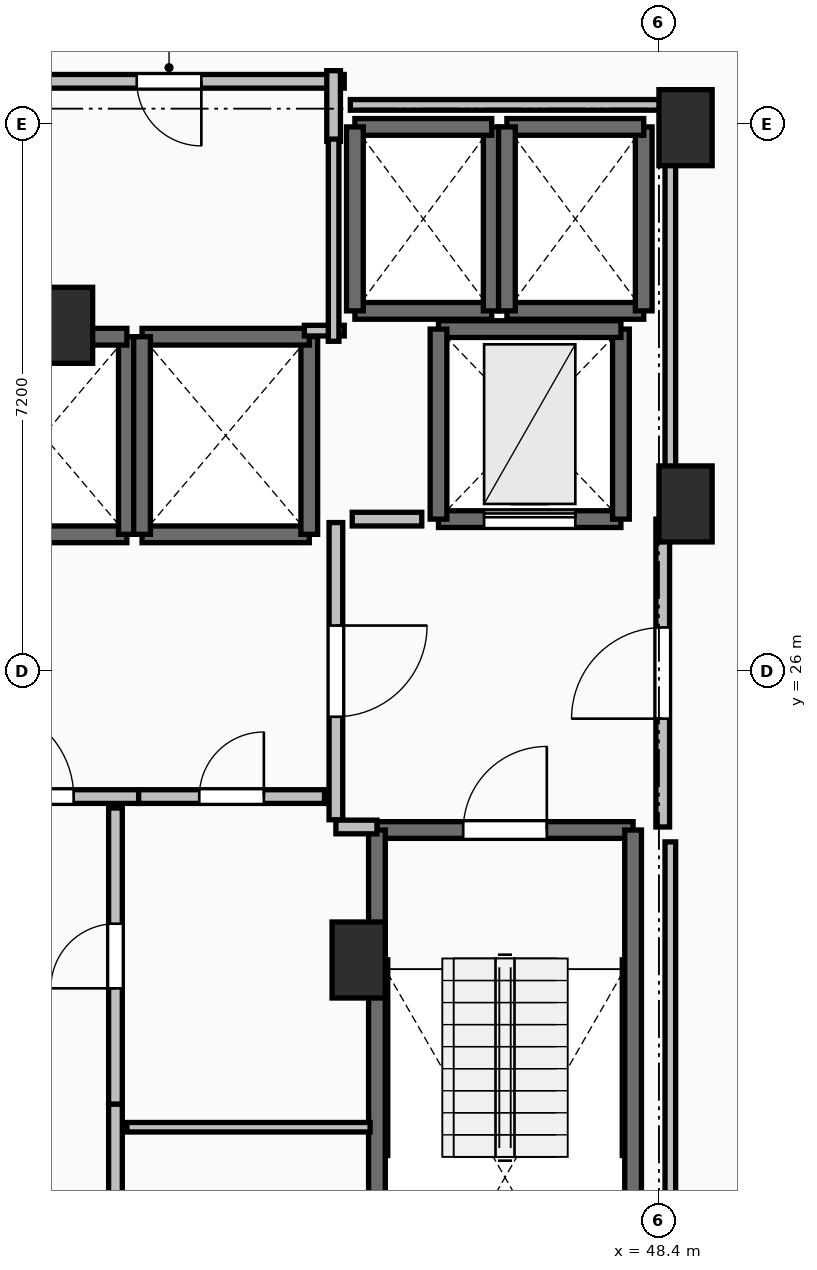
"""IFC4 building model, lengths in metres.
Left out: names, types, materials, properties, quantities, classifications, styles, units other than length and angle.
Written with IfcOpenShell. Run it as: python <this file> out.ifc"""

import sys

from ifc_helpers import new_model, si_unit, direction, frame, frame_2d, origin, origin_2d, place, context, subcontext, project, spatial, rectangle, extrude, element, fill, save


model = new_model("IFC4")
c1 = context("Model", 3, precision=1e-05, world=origin(), true_north=direction((0.0, 1.0)))
c2 = subcontext(c1, "Body", "Model", "MODEL_VIEW")
j1 = project(units=[si_unit("LENGTHUNIT", "METRE"), si_unit("PLANEANGLEUNIT", "RADIAN")], contexts=[c1])
p1 = place(None, origin())
s1 = spatial("IfcSite", under=j1, at=p1, CompositionType="ELEMENT")
p2 = place(p1, origin())
s2 = spatial("IfcBuilding", under=s1, at=p2, CompositionType="ELEMENT")
p3 = place(p2, frame((0.0, 0.0, 196.6)))
s3 = spatial("IfcBuildingStorey", under=s2, at=p3, CompositionType="ELEMENT", Elevation=196.6)
for number, where, z_axis, x_axis in (
    (1, (48.75, 33.15, 0.0), (0.0, 0.0, 1.0), (1.0, 0.0, 0.0)),
    (2, (48.75, 28.2, 0.0), (0.0, 0.0, 1.0), (1.0, 0.0, 0.0)),
    (3, (44.45, 22.2, 0.0), (0.0, 0.0, 1.0), (1.0, 0.0, 0.0)),
    (4, (40.6, 30.55, 0.0), (0.0, 0.0, 1.0), (1.0, 0.0, 0.0)),
):
    element("IfcColumn", number, at=place(p3, frame(where, z_axis=z_axis, x_axis=x_axis)), inside=s3, PredefinedType="PILASTER", context=c2, shape_type="SweptSolid", body=[
        extrude(rectangle(XDim=0.7, YDim=1.0, at=origin_2d()), origin(), (0.0, 0.0, 1.0), 3.5),
    ])
p4 = place(p3, frame((44.69, 23.91, 0.0), z_axis=(0.0, 0.0, 1.0), x_axis=(1.0, 0.0, 0.0)))
e5 = element("IfcWall", 5, at=p4, inside=s3, PredefinedType="SOLIDWALL", context=c2, shape_type="SweptSolid", body=[
    extrude(rectangle(XDim=3.37, YDim=0.22, at=frame_2d((1.685, 0.0))), origin(), (0.0, 0.0, 1.0), 3.24),
])
p5 = place(p4, frame((1.135, 0.0, 0.0)))
e6 = element("IfcOpeningElement", 6, at=p5, cuts=e5, PredefinedType="OPENING", context=c2, shape_type="SweptSolid", body=[
    extrude(rectangle(XDim=1.1, YDim=2.15, at=frame_2d((0.55, 1.075))), frame((0.0, 0.125, 0.0), z_axis=(0.0, -1.0, 0.0), x_axis=(1.0, 0.0, 0.0)), (0.0, 0.0, 1.0), 0.25),
])
for number, where, z_axis, x_axis in (
    (7, (48.06, 23.91, 0.0), (0.0, 0.0, 1.0), (0.0, -1.0, 0.0)),
    (8, (44.69, 16.49, 0.0), (0.0, 0.0, 1.0), (0.0, 1.0, 0.0)),
):
    element("IfcWall", number, at=place(p3, frame(where, z_axis=z_axis, x_axis=x_axis)), inside=s3, PredefinedType="SOLIDWALL", context=c2, shape_type="SweptSolid", body=[
        extrude(rectangle(XDim=7.42, YDim=0.22, at=frame_2d((3.71, 0.0))), origin(), (0.0, 0.0, 1.0), 3.24),
    ])
p6 = place(p3, frame((39.2, 27.8, 0.0), z_axis=(0.0, 0.0, 1.0), x_axis=(1.0, 0.0, 0.0)))
e9 = element("IfcWall", 9, at=p6, inside=s3, PredefinedType="SOLIDWALL", context=c2, shape_type="SweptSolid", body=[
    extrude(rectangle(XDim=2.2, YDim=0.22, at=frame_2d((1.1, 0.0))), origin(), (0.0, 0.0, 1.0), 3.24),
])
p7 = place(p3, frame((41.4, 27.8, 0.0), z_axis=(0.0, 0.0, 1.0), x_axis=(0.0, 1.0, 0.0)))
e10 = element("IfcWall", 10, at=p7, inside=s3, PredefinedType="SOLIDWALL", context=c2, shape_type="SweptSolid", body=[
    extrude(rectangle(XDim=2.6, YDim=0.22, at=frame_2d((1.3, 0.0))), origin(), (0.0, 0.0, 1.0), 3.24),
])
for number, where, z_axis, x_axis in (
    (11, (41.4, 30.4, 0.0), (0.0, 0.0, 1.0), (-1.0, 0.0, 0.0)),
    (12, (41.6, 27.8, 0.0), (0.0, 0.0, 1.0), (1.0, 0.0, 0.0)),
):
    element("IfcWall", number, at=place(p3, frame(where, z_axis=z_axis, x_axis=x_axis)), inside=s3, PredefinedType="SOLIDWALL", context=c2, shape_type="SweptSolid", body=[
        extrude(rectangle(XDim=2.2, YDim=0.22, at=frame_2d((1.1, 0.0))), origin(), (0.0, 0.0, 1.0), 3.24),
    ])
p8 = place(p3, frame((43.8, 27.8, 0.0), z_axis=(0.0, 0.0, 1.0), x_axis=(0.0, 1.0, 0.0)))
e13 = element("IfcWall", 13, at=p8, inside=s3, PredefinedType="SOLIDWALL", context=c2, shape_type="SweptSolid", body=[
    extrude(rectangle(XDim=2.6, YDim=0.22, at=frame_2d((1.3, 0.0))), origin(), (0.0, 0.0, 1.0), 3.24),
])
p9 = place(p3, frame((43.8, 30.4, 0.0), z_axis=(0.0, 0.0, 1.0), x_axis=(-1.0, 0.0, 0.0)))
e14 = element("IfcWall", 14, at=p9, inside=s3, PredefinedType="SOLIDWALL", context=c2, shape_type="SweptSolid", body=[
    extrude(rectangle(XDim=2.2, YDim=0.22, at=frame_2d((1.1, 0.0))), origin(), (0.0, 0.0, 1.0), 3.24),
])
p10 = place(p3, frame((41.6, 30.4, 0.0), z_axis=(0.0, 0.0, 1.0), x_axis=(0.0, -1.0, 0.0)))
e15 = element("IfcWall", 15, at=p10, inside=s3, PredefinedType="SOLIDWALL", context=c2, shape_type="SweptSolid", body=[
    extrude(rectangle(XDim=2.6, YDim=0.22, at=frame_2d((1.3, 0.0))), origin(), (0.0, 0.0, 1.0), 3.24),
])
p11 = place(p3, frame((44.4, 30.74, 0.0), z_axis=(0.0, 0.0, 1.0), x_axis=(1.0, 0.0, 0.0)))
e16 = element("IfcWall", 16, at=p11, inside=s3, PredefinedType="SOLIDWALL", context=c2, shape_type="SweptSolid", body=[
    extrude(rectangle(XDim=1.8, YDim=0.22, at=frame_2d((0.9, 0.0))), origin(), (0.0, 0.0, 1.0), 3.24),
])
p12 = place(p3, frame((46.2, 30.74, 0.0), z_axis=(0.0, 0.0, 1.0), x_axis=(0.0, 1.0, 0.0)))
e17 = element("IfcWall", 17, at=p12, inside=s3, PredefinedType="SOLIDWALL", context=c2, shape_type="SweptSolid", body=[
    extrude(rectangle(XDim=2.42, YDim=0.22, at=frame_2d((1.21, 0.0))), origin(), (0.0, 0.0, 1.0), 3.24),
])
p13 = place(p3, frame((46.2, 33.16, 0.0), z_axis=(0.0, 0.0, 1.0), x_axis=(-1.0, 0.0, 0.0)))
e18 = element("IfcWall", 18, at=p13, inside=s3, PredefinedType="SOLIDWALL", context=c2, shape_type="SweptSolid", body=[
    extrude(rectangle(XDim=1.8, YDim=0.22, at=frame_2d((0.9, 0.0))), origin(), (0.0, 0.0, 1.0), 3.24),
])
p14 = place(p3, frame((44.4, 33.16, 0.0), z_axis=(0.0, 0.0, 1.0), x_axis=(0.0, -1.0, 0.0)))
e19 = element("IfcWall", 19, at=p14, inside=s3, PredefinedType="SOLIDWALL", context=c2, shape_type="SweptSolid", body=[
    extrude(rectangle(XDim=2.42, YDim=0.22, at=frame_2d((1.21, 0.0))), origin(), (0.0, 0.0, 1.0), 3.24),
])
p15 = place(p3, frame((46.4, 30.74, 0.0), z_axis=(0.0, 0.0, 1.0), x_axis=(1.0, 0.0, 0.0)))
e20 = element("IfcWall", 20, at=p15, inside=s3, PredefinedType="SOLIDWALL", context=c2, shape_type="SweptSolid", body=[
    extrude(rectangle(XDim=1.8, YDim=0.22, at=frame_2d((0.9, 0.0))), origin(), (0.0, 0.0, 1.0), 3.24),
])
p16 = place(p3, frame((48.2, 30.74, 0.0), z_axis=(0.0, 0.0, 1.0), x_axis=(0.0, 1.0, 0.0)))
e21 = element("IfcWall", 21, at=p16, inside=s3, PredefinedType="SOLIDWALL", context=c2, shape_type="SweptSolid", body=[
    extrude(rectangle(XDim=2.42, YDim=0.22, at=frame_2d((1.21, 0.0))), origin(), (0.0, 0.0, 1.0), 3.24),
])
p17 = place(p3, frame((48.2, 33.16, 0.0), z_axis=(0.0, 0.0, 1.0), x_axis=(-1.0, 0.0, 0.0)))
e22 = element("IfcWall", 22, at=p17, inside=s3, PredefinedType="SOLIDWALL", context=c2, shape_type="SweptSolid", body=[
    extrude(rectangle(XDim=1.8, YDim=0.22, at=frame_2d((0.9, 0.0))), origin(), (0.0, 0.0, 1.0), 3.24),
])
p18 = place(p3, frame((46.4, 33.16, 0.0), z_axis=(0.0, 0.0, 1.0), x_axis=(0.0, -1.0, 0.0)))
e23 = element("IfcWall", 23, at=p18, inside=s3, PredefinedType="SOLIDWALL", context=c2, shape_type="SweptSolid", body=[
    extrude(rectangle(XDim=2.42, YDim=0.22, at=frame_2d((1.21, 0.0))), origin(), (0.0, 0.0, 1.0), 3.24),
])
p19 = place(p3, frame((45.5, 28.0, 0.0), z_axis=(0.0, 0.0, 1.0), x_axis=(1.0, 0.0, 0.0)))
e24 = element("IfcWall", 24, at=p19, inside=s3, PredefinedType="SHEAR", context=c2, shape_type="SweptSolid", body=[
    extrude(rectangle(XDim=2.4, YDim=0.22, at=frame_2d((1.2, 0.0))), origin(), (0.0, 0.0, 1.0), 3.24),
])
p20 = place(p19, frame((0.6, 0.0, 0.0)))
e25 = element("IfcOpeningElement", 25, at=p20, cuts=e24, PredefinedType="OPENING", context=c2, shape_type="SweptSolid", body=[
    extrude(rectangle(XDim=1.2, YDim=2.2, at=frame_2d((0.6, 1.1))), frame((0.0, 0.125, 0.0), z_axis=(0.0, -1.0, 0.0), x_axis=(1.0, 0.0, 0.0)), (0.0, 0.0, 1.0), 0.25),
])
p21 = place(p3, frame((47.9, 28.0, 0.0), z_axis=(0.0, 0.0, 1.0), x_axis=(0.0, 1.0, 0.0)))
e26 = element("IfcWall", 26, at=p21, inside=s3, PredefinedType="SHEAR", context=c2, shape_type="SweptSolid", body=[
    extrude(rectangle(XDim=2.5, YDim=0.22, at=frame_2d((1.25, 0.0))), origin(), (0.0, 0.0, 1.0), 3.24),
])
p22 = place(p3, frame((47.9, 30.5, 0.0), z_axis=(0.0, 0.0, 1.0), x_axis=(-1.0, 0.0, 0.0)))
e27 = element("IfcWall", 27, at=p22, inside=s3, PredefinedType="SHEAR", context=c2, shape_type="SweptSolid", body=[
    extrude(rectangle(XDim=2.4, YDim=0.22, at=frame_2d((1.2, 0.0))), origin(), (0.0, 0.0, 1.0), 3.24),
])
p23 = place(p3, frame((45.5, 30.5, 0.0), z_axis=(0.0, 0.0, 1.0), x_axis=(0.0, -1.0, 0.0)))
e28 = element("IfcWall", 28, at=p23, inside=s3, PredefinedType="SHEAR", context=c2, shape_type="SweptSolid", body=[
    extrude(rectangle(XDim=2.5, YDim=0.22, at=frame_2d((1.25, 0.0))), origin(), (0.0, 0.0, 1.0), 3.24),
])
p24 = place(p3, frame((44.15, 27.955, 0.0), z_axis=(0.0, 0.0, 1.0), x_axis=(0.0, -1.0, 0.0)))
e29 = element("IfcWall", 29, at=p24, inside=s3, PredefinedType="PARTITIONING", context=c2, shape_type="SweptSolid", body=[
    extrude(rectangle(XDim=3.91, YDim=0.18, at=frame_2d((1.955, 0.0))), origin(), (0.0, 0.0, 1.0), 3.24),
])
p25 = place(p24, frame((1.355, 0.0, 0.0)))
e30 = element("IfcOpeningElement", 30, at=p25, cuts=e29, PredefinedType="OPENING", context=c2, shape_type="SweptSolid", body=[
    extrude(rectangle(XDim=1.2, YDim=2.15, at=frame_2d((0.6, 1.075))), frame((0.0, 0.105, 0.0), z_axis=(0.0, -1.0, 0.0), x_axis=(1.0, 0.0, 0.0)), (0.0, 0.0, 1.0), 0.21),
])
p26 = place(p3, frame((44.15, 23.95, 0.0), z_axis=(0.0, 0.0, 1.0), x_axis=(1.0, 0.0, 0.0)))
e31 = element("IfcWall", 31, at=p26, inside=s3, PredefinedType="PARTITIONING", context=c2, shape_type="SweptSolid", body=[
    extrude(rectangle(XDim=0.54, YDim=0.18, at=frame_2d((0.27, 0.0))), origin(), (0.0, 0.0, 1.0), 3.24),
])
p27 = place(p3, frame((48.45, 23.95, 0.0), z_axis=(0.0, 0.0, 1.0), x_axis=(0.0, 1.0, 0.0)))
e32 = element("IfcWall", 32, at=p27, inside=s3, PredefinedType="PARTITIONING", context=c2, shape_type="SweptSolid", body=[
    extrude(rectangle(XDim=4.05, YDim=0.18, at=frame_2d((2.025, 0.0))), origin(), (0.0, 0.0, 1.0), 3.24),
])
p28 = place(p27, frame((1.425, 0.0, 0.0)))
e33 = element("IfcOpeningElement", 33, at=p28, cuts=e32, PredefinedType="OPENING", context=c2, shape_type="SweptSolid", body=[
    extrude(rectangle(XDim=1.2, YDim=2.15, at=frame_2d((0.6, 1.075))), frame((0.0, 0.105, 0.0), z_axis=(0.0, -1.0, 0.0), x_axis=(1.0, 0.0, 0.0)), (0.0, 0.0, 1.0), 0.21),
])
p29 = place(p3, frame((38.645, 24.35, 0.0), z_axis=(0.0, 0.0, 1.0), x_axis=(1.0, 0.0, 0.0)))
e34 = element("IfcWall", 34, at=p29, inside=s3, PredefinedType="PARTITIONING", context=c2, shape_type="SweptSolid", body=[
    extrude(rectangle(XDim=2.91, YDim=0.18, at=frame_2d((1.455, 0.0))), origin(), (0.0, 0.0, 1.0), 3.24),
])
p30 = place(p29, frame((0.855, 0.0, 0.0)))
e35 = element("IfcOpeningElement", 35, at=p30, cuts=e34, PredefinedType="OPENING", context=c2, shape_type="SweptSolid", body=[
    extrude(rectangle(XDim=1.2, YDim=2.15, at=frame_2d((0.6, 1.075))), frame((0.0, 0.105, 0.0), z_axis=(0.0, -1.0, 0.0), x_axis=(1.0, 0.0, 0.0)), (0.0, 0.0, 1.0), 0.21),
])
p31 = place(p3, frame((41.555, 24.35, 0.0), z_axis=(0.0, 0.0, 1.0), x_axis=(1.0, 0.0, 0.0)))
e36 = element("IfcWall", 36, at=p31, inside=s3, PredefinedType="PARTITIONING", context=c2, shape_type="SweptSolid", body=[
    extrude(rectangle(XDim=2.445, YDim=0.18, at=frame_2d((1.223, 0.0))), origin(), (0.0, 0.0, 1.0), 3.24),
])
p32 = place(p31, frame((0.798, 0.0, 0.0)))
e37 = element("IfcOpeningElement", 37, at=p32, cuts=e36, PredefinedType="OPENING", context=c2, shape_type="SweptSolid", body=[
    extrude(rectangle(XDim=0.85, YDim=2.1, at=frame_2d((0.425, 1.05))), frame((0.0, 0.105, 0.0), z_axis=(0.0, -1.0, 0.0), x_axis=(1.0, 0.0, 0.0)), (0.0, 0.0, 1.0), 0.21),
])
p33 = place(p3, frame((41.25, 16.32, 0.0), z_axis=(0.0, 0.0, 1.0), x_axis=(0.0, 1.0, 0.0)))
e38 = element("IfcWall", 38, at=p33, inside=s3, PredefinedType="PARTITIONING", context=c2, shape_type="SweptSolid", body=[
    extrude(rectangle(XDim=3.985, YDim=0.18, at=frame_2d((1.992, 0.0))), origin(), (0.0, 0.0, 1.0), 3.24),
])
p34 = place(p33, frame((1.593, 0.0, 0.0)))
e39 = element("IfcOpeningElement", 39, at=p34, cuts=e38, PredefinedType="OPENING", context=c2, shape_type="SweptSolid", body=[
    extrude(rectangle(XDim=0.8, YDim=2.05, at=frame_2d((0.4, 1.025))), frame((0.0, 0.105, 0.0), z_axis=(0.0, -1.0, 0.0), x_axis=(1.0, 0.0, 0.0)), (0.0, 0.0, 1.0), 0.21),
])
p35 = place(p3, frame((41.25, 20.305, 0.0), z_axis=(0.0, 0.0, 1.0), x_axis=(0.0, 1.0, 0.0)))
e40 = element("IfcWall", 40, at=p35, inside=s3, PredefinedType="PARTITIONING", context=c2, shape_type="SweptSolid", body=[
    extrude(rectangle(XDim=3.895, YDim=0.18, at=frame_2d((1.948, 0.0))), origin(), (0.0, 0.0, 1.0), 3.24),
])
p36 = place(p35, frame((1.522, 0.0, 0.0)))
e41 = element("IfcOpeningElement", 41, at=p36, cuts=e40, PredefinedType="OPENING", context=c2, shape_type="SweptSolid", body=[
    extrude(rectangle(XDim=0.85, YDim=2.1, at=frame_2d((0.425, 1.05))), frame((0.0, 0.105, 0.0), z_axis=(0.0, -1.0, 0.0), x_axis=(1.0, 0.0, 0.0)), (0.0, 0.0, 1.0), 0.21),
])
p37 = place(p3, frame((44.6, 20.0, 0.0), z_axis=(0.0, 0.0, 1.0), x_axis=(-1.0, 0.0, 0.0)))
e42 = element("IfcWall", 42, at=p37, inside=s3, PredefinedType="PARTITIONING", context=c2, shape_type="SweptSolid", body=[
    extrude(rectangle(XDim=3.2, YDim=0.125, at=frame_2d((1.6, 0.0))), origin(), (0.0, 0.0, 1.0), 3.24),
])
p38 = place(p3, frame((44.26, 33.76, 0.0), z_axis=(0.0, 0.0, 1.0), x_axis=(-1.0, 0.0, 0.0)))
e43 = element("IfcWall", 43, at=p38, inside=s3, PredefinedType="PARTITIONING", context=c2, shape_type="SweptSolid", body=[
    extrude(rectangle(XDim=4.61, YDim=0.18, at=frame_2d((2.305, 0.0))), origin(), (0.0, 0.0, 1.0), 3.24),
])
p39 = place(p38, frame((1.88, 0.0, 0.0)))
e44 = element("IfcOpeningElement", 44, at=p39, cuts=e43, PredefinedType="OPENING", context=c2, shape_type="SweptSolid", body=[
    extrude(rectangle(XDim=0.85, YDim=2.1, at=frame_2d((0.425, 1.05))), frame((0.0, 0.105, 0.0), z_axis=(0.0, -1.0, 0.0), x_axis=(1.0, 0.0, 0.0)), (0.0, 0.0, 1.0), 0.21),
])
p40 = place(p3, frame((44.12, 32.97, 0.0), z_axis=(0.0, 0.0, 1.0), x_axis=(0.0, 1.0, 0.0)))
e45 = element("IfcWall", 45, at=p40, inside=s3, PredefinedType="PARTITIONING", context=c2, shape_type="SweptSolid", body=[
    extrude(rectangle(XDim=0.93, YDim=0.18, at=frame_2d((0.465, 0.0))), origin(), (0.0, 0.0, 1.0), 3.24),
])
p41 = place(p3, frame((45.28, 28.0, 0.0), z_axis=(0.0, 0.0, 1.0), x_axis=(-1.0, 0.0, 0.0)))
e46 = element("IfcWall", 46, at=p41, inside=s3, PredefinedType="PARTITIONING", context=c2, shape_type="SweptSolid", body=[
    extrude(rectangle(XDim=0.915, YDim=0.18, at=frame_2d((0.458, 0.0))), origin(), (0.0, 0.0, 1.0), 3.24),
])
p42 = place(p3, frame((43.735, 30.48, 0.0), z_axis=(0.0, 0.0, 1.0), x_axis=(1.0, 0.0, 0.0)))
e47 = element("IfcWall", 47, at=p42, inside=s3, PredefinedType="PARTITIONING", context=c2, shape_type="SweptSolid", body=[
    extrude(rectangle(XDim=0.525, YDim=0.14, at=frame_2d((0.262, 0.0))), origin(), (0.0, 0.0, 1.0), 3.24),
])
p43 = place(p3, frame((44.12, 30.34, 0.0), z_axis=(0.0, 0.0, 1.0), x_axis=(0.0, 1.0, 0.0)))
e48 = element("IfcWall", 48, at=p43, inside=s3, PredefinedType="PARTITIONING", context=c2, shape_type="SweptSolid", body=[
    extrude(rectangle(XDim=2.66, YDim=0.14, at=frame_2d((1.33, 0.0))), origin(), (0.0, 0.0, 1.0), 3.24),
])
p44 = place(p3, frame((48.55, 16.24, 0.0), z_axis=(0.0, 0.0, 1.0), x_axis=(0.0, 1.0, 0.0)))
e49 = element("IfcWall", 49, at=p44, inside=s3, PredefinedType="PARTITIONING", context=c2, shape_type="SweptSolid", body=[
    extrude(rectangle(XDim=7.514, YDim=0.14, at=frame_2d((3.757, 0.0))), origin(), (0.0, 0.0, 1.0), 2.432),
])
p45 = place(p3, frame((48.55, 28.196, 0.0), z_axis=(0.0, 0.0, 1.0), x_axis=(0.0, 1.0, 0.0)))
e50 = element("IfcWall", 50, at=p45, inside=s3, PredefinedType="PARTITIONING", context=c2, shape_type="SweptSolid", body=[
    extrude(rectangle(XDim=5.254, YDim=0.14, at=frame_2d((2.627, 0.0))), origin(), (0.0, 0.0, 1.0), 2.432),
])
p46 = place(p3, frame((48.55, 33.45, 0.0), z_axis=(0.0, 0.0, 1.0), x_axis=(-1.0, 0.0, 0.0)))
e51 = element("IfcWall", 51, at=p46, inside=s3, PredefinedType="PARTITIONING", context=c2, shape_type="SweptSolid", body=[
    extrude(rectangle(XDim=4.21, YDim=0.14, at=frame_2d((2.105, 0.0))), origin(), (0.0, 0.0, 1.0), 2.432),
])
p47 = place(p5, origin())
e52 = element("IfcDoor", 52, at=p47, inside=s3, OperationType="SINGLE_SWING_RIGHT", PredefinedType="DOOR", context=c2, shape_type="SweptSolid", body=[
    extrude(rectangle(XDim=1.1, YDim=2.15, at=frame_2d((0.55, 1.075))), frame((0.0, 0.025, 0.0), z_axis=(0.0, -1.0, 0.0), x_axis=(1.0, 0.0, 0.0)), (0.0, 0.0, 1.0), 0.05),
])
fill(e6, e52)
p48 = place(p20, origin())
e53 = element("IfcDoor", 53, at=p48, inside=s3, OperationType="SLIDING_TO_LEFT", PredefinedType="DOOR", context=c2, shape_type="SweptSolid", body=[
    extrude(rectangle(XDim=1.2, YDim=2.2, at=frame_2d((0.6, 1.1))), frame((0.0, 0.025, 0.0), z_axis=(0.0, -1.0, 0.0), x_axis=(1.0, 0.0, 0.0)), (0.0, 0.0, 1.0), 0.05),
])
fill(e25, e53)
p49 = place(p25, origin())
e54 = element("IfcDoor", 54, at=p49, inside=s3, OperationType="SINGLE_SWING_LEFT", PredefinedType="DOOR", context=c2, shape_type="SweptSolid", body=[
    extrude(rectangle(XDim=1.2, YDim=2.15, at=frame_2d((0.6, 1.075))), frame((0.0, 0.025, 0.0), z_axis=(0.0, -1.0, 0.0), x_axis=(1.0, 0.0, 0.0)), (0.0, 0.0, 1.0), 0.05),
])
fill(e30, e54)
p50 = place(p28, origin())
e55 = element("IfcDoor", 55, at=p50, inside=s3, OperationType="SINGLE_SWING_LEFT", PredefinedType="DOOR", context=c2, shape_type="SweptSolid", body=[
    extrude(rectangle(XDim=1.2, YDim=2.15, at=frame_2d((0.6, 1.075))), frame((0.0, 0.025, 0.0), z_axis=(0.0, -1.0, 0.0), x_axis=(1.0, 0.0, 0.0)), (0.0, 0.0, 1.0), 0.05),
])
fill(e33, e55)
p51 = place(p30, origin())
e56 = element("IfcDoor", 56, at=p51, inside=s3, OperationType="SINGLE_SWING_LEFT", PredefinedType="DOOR", context=c2, shape_type="SweptSolid", body=[
    extrude(rectangle(XDim=1.2, YDim=2.15, at=frame_2d((0.6, 1.075))), frame((0.0, 0.025, 0.0), z_axis=(0.0, -1.0, 0.0), x_axis=(1.0, 0.0, 0.0)), (0.0, 0.0, 1.0), 0.05),
])
fill(e35, e56)
p52 = place(p32, origin())
e57 = element("IfcDoor", 57, at=p52, inside=s3, OperationType="SINGLE_SWING_RIGHT", PredefinedType="DOOR", context=c2, shape_type="SweptSolid", body=[
    extrude(rectangle(XDim=0.85, YDim=2.1, at=frame_2d((0.425, 1.05))), frame((0.0, 0.025, 0.0), z_axis=(0.0, -1.0, 0.0), x_axis=(1.0, 0.0, 0.0)), (0.0, 0.0, 1.0), 0.05),
])
fill(e37, e57)
p53 = place(p36, origin())
e58 = element("IfcDoor", 58, at=p53, inside=s3, OperationType="SINGLE_SWING_LEFT", PredefinedType="DOOR", context=c2, shape_type="SweptSolid", body=[
    extrude(rectangle(XDim=0.85, YDim=2.1, at=frame_2d((0.425, 1.05))), frame((0.0, 0.025, 0.0), z_axis=(0.0, -1.0, 0.0), x_axis=(1.0, 0.0, 0.0)), (0.0, 0.0, 1.0), 0.05),
])
fill(e41, e58)
p54 = place(p39, origin())
e59 = element("IfcDoor", 59, at=p54, inside=s3, OperationType="SINGLE_SWING_LEFT", PredefinedType="DOOR", context=c2, shape_type="SweptSolid", body=[
    extrude(rectangle(XDim=0.85, YDim=2.1, at=frame_2d((0.425, 1.05))), frame((0.0, 0.025, 0.0), z_axis=(0.0, -1.0, 0.0), x_axis=(1.0, 0.0, 0.0)), (0.0, 0.0, 1.0), 0.05),
])
fill(e44, e59)
save(model, sys.argv[1])
